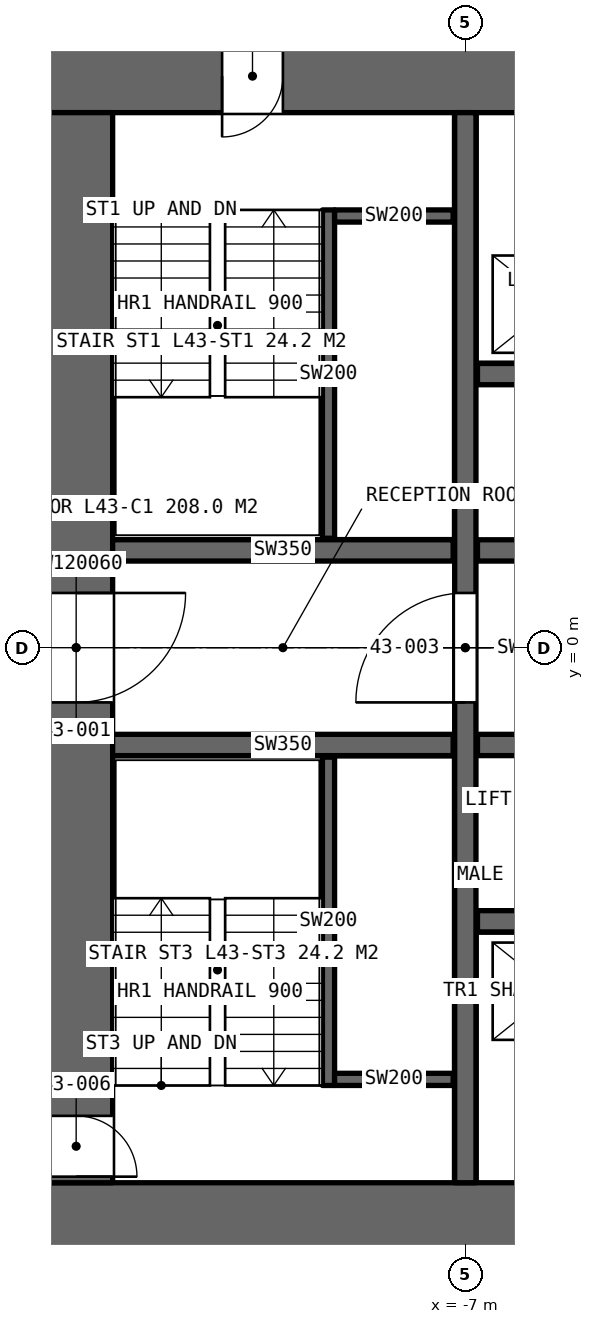
"""IFC4 building model, lengths in metres.
Left out: names, types, materials, properties, quantities, classifications, styles, units other than length and angle.
Written with IfcOpenShell. Run it as: python <this file> out.ifc"""

import sys

from ifc_helpers import new_model, si_unit, direction, frame, frame_2d, origin, place, context, subcontext, project, spatial, rectangle, extrude, element, fill, save


model = new_model("IFC4")
c1 = context("Model", 3, precision=1e-05, world=origin(), true_north=direction((0.0, 1.0)))
c2 = subcontext(c1, "Body", "Model", "MODEL_VIEW")
j1 = project(units=[si_unit("LENGTHUNIT", "METRE"), si_unit("PLANEANGLEUNIT", "RADIAN")], contexts=[c1])
p1 = place(None, origin())
s1 = spatial("IfcSite", under=j1, at=p1, CompositionType="ELEMENT")
p2 = place(p1, origin())
s2 = spatial("IfcBuilding", under=s1, at=p2, CompositionType="ELEMENT")
p3 = place(p2, frame((0.0, 0.0, 199.0)))
s3 = spatial("IfcBuildingStorey", under=s2, at=p3, CompositionType="ELEMENT", Elevation=199.0)
p4 = place(p3, frame((-14.0, -9.4, 0.0), z_axis=(0.0, 0.0, 1.0), x_axis=(1.0, 0.0, 0.0)))
e1 = element("IfcWall", 1, at=p4, inside=s3, PredefinedType="SHEAR", context=c2, shape_type="SweptSolid", body=[
    extrude(rectangle(XDim=28.0, YDim=1.2, at=frame_2d((14.0, 0.0))), origin(), (0.0, 0.0, 1.0), 4.2),
])
p5 = place(p4, frame((22.9, 0.0, 0.0)))
e2 = element("IfcOpeningElement", 2, at=p5, cuts=e1, PredefinedType="OPENING", context=c2, shape_type="SweptSolid", body=[
    extrude(rectangle(XDim=2.2, YDim=2.7, at=frame_2d((1.1, 1.35))), frame((0.0, 0.61, 0.0), z_axis=(0.0, -1.0, 0.0), x_axis=(1.0, 0.0, 0.0)), (0.0, 0.0, 1.0), 1.22),
])
p6 = place(p3, frame((14.0, 9.4, 0.0), z_axis=(0.0, 0.0, 1.0), x_axis=(-1.0, 0.0, 0.0)))
e3 = element("IfcWall", 3, at=p6, inside=s3, PredefinedType="SHEAR", context=c2, shape_type="SweptSolid", body=[
    extrude(rectangle(XDim=28.0, YDim=1.2, at=frame_2d((14.0, 0.0))), origin(), (0.0, 0.0, 1.0), 4.2),
])
p7 = place(p6, frame((24.0, 0.0, 0.0)))
e4 = element("IfcOpeningElement", 4, at=p7, cuts=e3, PredefinedType="OPENING", context=c2, shape_type="SweptSolid", body=[
    extrude(rectangle(XDim=1.0, YDim=2.4, at=frame_2d((0.5, 1.2))), frame((0.0, 0.61, 0.0), z_axis=(0.0, -1.0, 0.0), x_axis=(1.0, 0.0, 0.0)), (0.0, 0.0, 1.0), 1.22),
])
p8 = place(p3, frame((-13.4, 8.8, 0.0), z_axis=(0.0, 0.0, 1.0), x_axis=(0.0, -1.0, 0.0)))
e5 = element("IfcWall", 5, at=p8, inside=s3, PredefinedType="SHEAR", context=c2, shape_type="SweptSolid", body=[
    extrude(rectangle(XDim=17.6, YDim=1.2, at=frame_2d((8.8, 0.0))), origin(), (0.0, 0.0, 1.0), 4.2),
])
p9 = place(p8, frame((7.9, 0.0, 0.0)))
e6 = element("IfcOpeningElement", 6, at=p9, cuts=e5, PredefinedType="OPENING", context=c2, shape_type="SweptSolid", body=[
    extrude(rectangle(XDim=1.8, YDim=2.4, at=frame_2d((0.9, 1.2))), frame((0.0, 0.61, 0.0), z_axis=(0.0, -1.0, 0.0), x_axis=(1.0, 0.0, 0.0)), (0.0, 0.0, 1.0), 1.22),
])
p10 = place(p8, frame((16.5, 0.0, 0.0)))
e7 = element("IfcOpeningElement", 7, at=p10, cuts=e5, PredefinedType="OPENING", context=c2, shape_type="SweptSolid", body=[
    extrude(rectangle(XDim=1.0, YDim=2.4, at=frame_2d((0.5, 1.2))), frame((0.0, 0.61, 0.0), z_axis=(0.0, -1.0, 0.0), x_axis=(1.0, 0.0, 0.0)), (0.0, 0.0, 1.0), 1.22),
])
p11 = place(p3, frame((-7.0, -8.8, 0.0), z_axis=(0.0, 0.0, 1.0), x_axis=(0.0, 1.0, 0.0)))
e8 = element("IfcWall", 8, at=p11, inside=s3, PredefinedType="SHEAR", context=c2, shape_type="SweptSolid", body=[
    extrude(rectangle(XDim=17.6, YDim=0.35, at=frame_2d((8.8, 0.0))), origin(), (0.0, 0.0, 1.0), 4.2),
])
p12 = place(p11, frame((7.9, 0.0, 0.0)))
e9 = element("IfcOpeningElement", 9, at=p12, cuts=e8, PredefinedType="OPENING", context=c2, shape_type="SweptSolid", body=[
    extrude(rectangle(XDim=1.8, YDim=2.4, at=frame_2d((0.9, 1.2))), frame((0.0, 0.185, 0.0), z_axis=(0.0, -1.0, 0.0), x_axis=(1.0, 0.0, 0.0)), (0.0, 0.0, 1.0), 0.37),
])
p13 = place(p3, frame((-6.8, 1.6, 0.0), z_axis=(0.0, 0.0, 1.0), x_axis=(1.0, 0.0, 0.0)))
e10 = element("IfcWall", 10, at=p13, inside=s3, PredefinedType="SHEAR", context=c2, shape_type="SweptSolid", body=[
    extrude(rectangle(XDim=13.6, YDim=0.35, at=frame_2d((6.8, 0.0))), origin(), (0.0, 0.0, 1.0), 4.2),
])
p14 = place(p13, frame((11.9, 0.0, 0.0)))
e11 = element("IfcOpeningElement", 11, at=p14, cuts=e10, PredefinedType="OPENING", context=c2, shape_type="SweptSolid", body=[
    extrude(rectangle(XDim=1.0, YDim=2.4, at=frame_2d((0.5, 1.2))), frame((0.0, 0.185, 0.0), z_axis=(0.0, -1.0, 0.0), x_axis=(1.0, 0.0, 0.0)), (0.0, 0.0, 1.0), 0.37),
])
p15 = place(p13, frame((4.5, 0.0, 0.0)))
e12 = element("IfcOpeningElement", 12, at=p15, cuts=e10, PredefinedType="OPENING", context=c2, shape_type="SweptSolid", body=[
    extrude(rectangle(XDim=1.8, YDim=2.4, at=frame_2d((0.9, 1.2))), frame((0.0, 0.185, 0.0), z_axis=(0.0, -1.0, 0.0), x_axis=(1.0, 0.0, 0.0)), (0.0, 0.0, 1.0), 0.37),
])
p16 = place(p3, frame((-6.8, -1.6, 0.0), z_axis=(0.0, 0.0, 1.0), x_axis=(1.0, 0.0, 0.0)))
e13 = element("IfcWall", 13, at=p16, inside=s3, PredefinedType="SHEAR", context=c2, shape_type="SweptSolid", body=[
    extrude(rectangle(XDim=13.6, YDim=0.35, at=frame_2d((6.8, 0.0))), origin(), (0.0, 0.0, 1.0), 4.2),
])
p17 = place(p16, frame((1.265, 0.0, 0.0)))
e14 = element("IfcOpeningElement", 14, at=p17, cuts=e13, PredefinedType="OPENING", context=c2, shape_type="SweptSolid", body=[
    extrude(rectangle(XDim=1.0, YDim=2.4, at=frame_2d((0.5, 1.2))), frame((0.0, 0.185, 0.0), z_axis=(0.0, -1.0, 0.0), x_axis=(1.0, 0.0, 0.0)), (0.0, 0.0, 1.0), 0.37),
])
p18 = place(p16, frame((4.9, 0.0, 0.0)))
e15 = element("IfcOpeningElement", 15, at=p18, cuts=e13, PredefinedType="OPENING", context=c2, shape_type="SweptSolid", body=[
    extrude(rectangle(XDim=1.0, YDim=2.4, at=frame_2d((0.5, 1.2))), frame((0.0, 0.185, 0.0), z_axis=(0.0, -1.0, 0.0), x_axis=(1.0, 0.0, 0.0)), (0.0, 0.0, 1.0), 0.37),
])
p19 = place(p16, frame((8.485, 0.0, 0.0)))
e16 = element("IfcOpeningElement", 16, at=p19, cuts=e13, PredefinedType="OPENING", context=c2, shape_type="SweptSolid", body=[
    extrude(rectangle(XDim=1.1, YDim=2.4, at=frame_2d((0.55, 1.2))), frame((0.0, 0.185, 0.0), z_axis=(0.0, -1.0, 0.0), x_axis=(1.0, 0.0, 0.0)), (0.0, 0.0, 1.0), 0.37),
])
p20 = place(p16, frame((11.95, 0.0, 0.0)))
e17 = element("IfcOpeningElement", 17, at=p20, cuts=e13, PredefinedType="OPENING", context=c2, shape_type="SweptSolid", body=[
    extrude(rectangle(XDim=0.9, YDim=2.4, at=frame_2d((0.45, 1.2))), frame((0.0, 0.185, 0.0), z_axis=(0.0, -1.0, 0.0), x_axis=(1.0, 0.0, 0.0)), (0.0, 0.0, 1.0), 0.37),
])
p21 = place(p3, frame((-6.8, 4.5, 0.0), z_axis=(0.0, 0.0, 1.0), x_axis=(1.0, 0.0, 0.0)))
e18 = element("IfcWall", 18, at=p21, inside=s3, PredefinedType="SHEAR", context=c2, shape_type="SweptSolid", body=[
    extrude(rectangle(XDim=13.6, YDim=0.35, at=frame_2d((6.8, 0.0))), origin(), (0.0, 0.0, 1.0), 4.2),
])
p22 = place(p21, frame((0.7, 0.0, 0.0)))
e19 = element("IfcOpeningElement", 19, at=p22, cuts=e18, PredefinedType="OPENING", context=c2, shape_type="SweptSolid", body=[
    extrude(rectangle(XDim=1.1, YDim=2.4, at=frame_2d((0.55, 1.2))), frame((0.0, 0.185, 0.0), z_axis=(0.0, -1.0, 0.0), x_axis=(1.0, 0.0, 0.0)), (0.0, 0.0, 1.0), 0.37),
])
p23 = place(p21, frame((3.5, 0.0, 0.0)))
e20 = element("IfcOpeningElement", 20, at=p23, cuts=e18, PredefinedType="OPENING", context=c2, shape_type="SweptSolid", body=[
    extrude(rectangle(XDim=1.1, YDim=2.4, at=frame_2d((0.55, 1.2))), frame((0.0, 0.185, 0.0), z_axis=(0.0, -1.0, 0.0), x_axis=(1.0, 0.0, 0.0)), (0.0, 0.0, 1.0), 0.37),
])
p24 = place(p21, frame((6.3, 0.0, 0.0)))
e21 = element("IfcOpeningElement", 21, at=p24, cuts=e18, PredefinedType="OPENING", context=c2, shape_type="SweptSolid", body=[
    extrude(rectangle(XDim=1.1, YDim=2.4, at=frame_2d((0.55, 1.2))), frame((0.0, 0.185, 0.0), z_axis=(0.0, -1.0, 0.0), x_axis=(1.0, 0.0, 0.0)), (0.0, 0.0, 1.0), 0.37),
])
p25 = place(p21, frame((9.1, 0.0, 0.0)))
e22 = element("IfcOpeningElement", 22, at=p25, cuts=e18, PredefinedType="OPENING", context=c2, shape_type="SweptSolid", body=[
    extrude(rectangle(XDim=1.1, YDim=2.4, at=frame_2d((0.55, 1.2))), frame((0.0, 0.185, 0.0), z_axis=(0.0, -1.0, 0.0), x_axis=(1.0, 0.0, 0.0)), (0.0, 0.0, 1.0), 0.37),
])
p26 = place(p3, frame((-6.8, -4.5, 0.0), z_axis=(0.0, 0.0, 1.0), x_axis=(1.0, 0.0, 0.0)))
e23 = element("IfcWall", 23, at=p26, inside=s3, PredefinedType="SHEAR", context=c2, shape_type="SweptSolid", body=[
    extrude(rectangle(XDim=13.6, YDim=0.35, at=frame_2d((6.8, 0.0))), origin(), (0.0, 0.0, 1.0), 4.2),
])
for number, where, z_axis, x_axis in (
    (24, (-12.8, 1.6, 0.0), (0.0, 0.0, 1.0), (1.0, 0.0, 0.0)),
    (25, (-12.8, -1.6, 0.0), (0.0, 0.0, 1.0), (1.0, 0.0, 0.0)),
):
    element("IfcWall", number, at=place(p3, frame(where, z_axis=z_axis, x_axis=x_axis)), inside=s3, PredefinedType="SHEAR", context=c2, shape_type="SweptSolid", body=[
        extrude(rectangle(XDim=5.6, YDim=0.35, at=frame_2d((2.8, 0.0))), origin(), (0.0, 0.0, 1.0), 4.2),
    ])
p27 = place(p3, frame((-9.25, 7.2, 0.0), z_axis=(0.0, 0.0, 1.0), x_axis=(0.0, -1.0, 0.0)))
e26 = element("IfcWall", 26, at=p27, inside=s3, PredefinedType="SOLIDWALL", context=c2, shape_type="SweptSolid", body=[
    extrude(rectangle(XDim=5.4, YDim=0.2, at=frame_2d((2.7, 0.0))), origin(), (0.0, 0.0, 1.0), 4.2),
])
p28 = place(p3, frame((-9.15, 7.1, 0.0), z_axis=(0.0, 0.0, 1.0), x_axis=(1.0, 0.0, 0.0)))
e27 = element("IfcWall", 27, at=p28, inside=s3, PredefinedType="SOLIDWALL", context=c2, shape_type="SweptSolid", body=[
    extrude(rectangle(XDim=1.95, YDim=0.2, at=frame_2d((0.975, 0.0))), origin(), (0.0, 0.0, 1.0), 4.2),
])
p29 = place(p3, frame((-9.25, -7.2, 0.0), z_axis=(0.0, 0.0, 1.0), x_axis=(0.0, 1.0, 0.0)))
e28 = element("IfcWall", 28, at=p29, inside=s3, PredefinedType="SOLIDWALL", context=c2, shape_type="SweptSolid", body=[
    extrude(rectangle(XDim=5.4, YDim=0.2, at=frame_2d((2.7, 0.0))), origin(), (0.0, 0.0, 1.0), 4.2),
])
p30 = place(p3, frame((-9.15, -7.1, 0.0), z_axis=(0.0, 0.0, 1.0), x_axis=(1.0, 0.0, 0.0)))
e29 = element("IfcWall", 29, at=p30, inside=s3, PredefinedType="SOLIDWALL", context=c2, shape_type="SweptSolid", body=[
    extrude(rectangle(XDim=1.95, YDim=0.2, at=frame_2d((0.975, 0.0))), origin(), (0.0, 0.0, 1.0), 4.2),
])
p31 = place(p9, origin())
e30 = element("IfcDoor", 30, at=p31, inside=s3, OperationType="DOUBLE_DOOR_SINGLE_SWING", PredefinedType="DOOR", context=c2, shape_type="SweptSolid", body=[
    extrude(rectangle(XDim=1.8, YDim=2.4, at=frame_2d((0.9, 1.2))), frame((0.0, 0.025, 0.0), z_axis=(0.0, -1.0, 0.0), x_axis=(1.0, 0.0, 0.0)), (0.0, 0.0, 1.0), 0.05),
])
fill(e6, e30)
p32 = place(p12, origin())
e31 = element("IfcDoor", 31, at=p32, inside=s3, OperationType="DOUBLE_DOOR_SINGLE_SWING", PredefinedType="DOOR", context=c2, shape_type="SweptSolid", body=[
    extrude(rectangle(XDim=1.8, YDim=2.4, at=frame_2d((0.9, 1.2))), frame((0.0, 0.025, 0.0), z_axis=(0.0, -1.0, 0.0), x_axis=(1.0, 0.0, 0.0)), (0.0, 0.0, 1.0), 0.05),
])
fill(e9, e31)
p33 = place(p7, origin())
e32 = element("IfcDoor", 32, at=p33, inside=s3, OperationType="SINGLE_SWING_RIGHT", PredefinedType="DOOR", context=c2, shape_type="SweptSolid", body=[
    extrude(rectangle(XDim=1.0, YDim=2.4, at=frame_2d((0.5, 1.2))), frame((0.0, 0.025, 0.0), z_axis=(0.0, -1.0, 0.0), x_axis=(1.0, 0.0, 0.0)), (0.0, 0.0, 1.0), 0.05),
])
fill(e4, e32)
p34 = place(p10, origin())
e33 = element("IfcDoor", 33, at=p34, inside=s3, OperationType="SINGLE_SWING_RIGHT", PredefinedType="DOOR", context=c2, shape_type="SweptSolid", body=[
    extrude(rectangle(XDim=1.0, YDim=2.4, at=frame_2d((0.5, 1.2))), frame((0.0, 0.025, 0.0), z_axis=(0.0, -1.0, 0.0), x_axis=(1.0, 0.0, 0.0)), (0.0, 0.0, 1.0), 0.05),
])
fill(e7, e33)
save(model, sys.argv[1])
